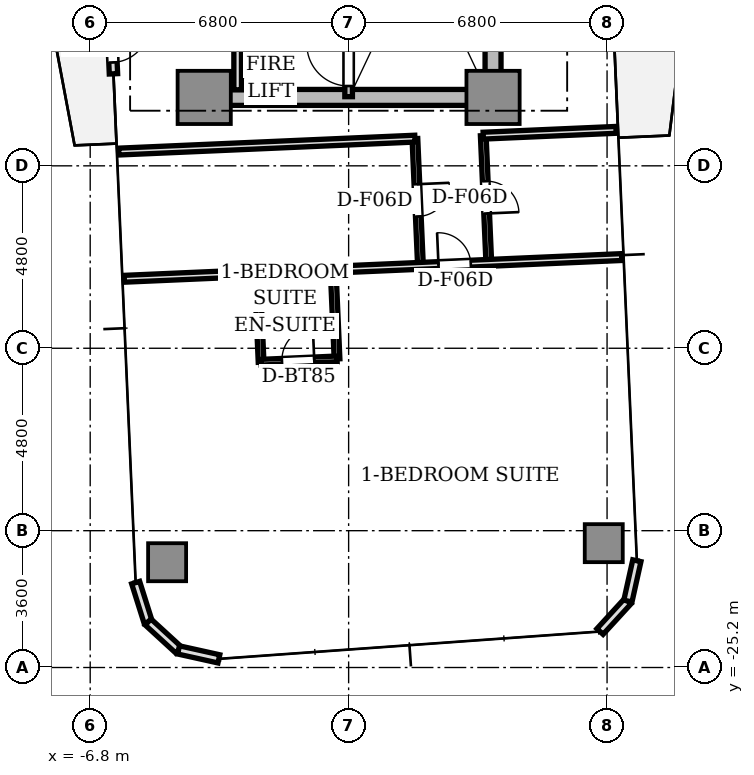
"""IFC4 building model, lengths in metres.
Left out: names, types, materials, properties, quantities, classifications, styles, units other than length and angle.
Written with IfcOpenShell. Run it as: python <this file> out.ifc"""

import sys

from ifc_helpers import new_model, si_unit, direction, frame, frame_2d, origin, origin_2d, place, context, subcontext, project, spatial, rectangle, extrude, source, transform, mapped, element, fill, save


model = new_model("IFC4")
c1 = context("Model", 3, precision=1e-05, world=origin(), true_north=direction((0.0, 1.0)))
c2 = subcontext(c1, "Body", "Model", "MODEL_VIEW")
j1 = project(units=[si_unit("LENGTHUNIT", "METRE"), si_unit("PLANEANGLEUNIT", "RADIAN")], contexts=[c1])
p1 = place(None, origin())
s1 = spatial("IfcSite", under=j1, at=p1, CompositionType="ELEMENT")
p2 = place(p1, origin())
s2 = spatial("IfcBuilding", under=s1, at=p2, CompositionType="ELEMENT")
p3 = place(p2, frame((0.0, 0.0, 100.25)))
s3 = spatial("IfcBuildingStorey", under=s2, at=p3, CompositionType="ELEMENT", Elevation=100.25)
p4 = place(p3, frame((-3.55, -10.2, 0.0), z_axis=(0.0, 0.0, 1.0), x_axis=(1.0, 0.0, 0.0)))
e1 = element("IfcWall", 1, at=p4, inside=s3, PredefinedType="SHEAR", context=c2, shape_type="SweptSolid", body=[
    extrude(rectangle(XDim=7.1, YDim=0.42, at=frame_2d((3.55, 0.0))), origin(), (0.0, 0.0, 1.0), 3.11),
])
p5 = place(p3, frame((3.8, -9.75, 0.0), z_axis=(0.0, 0.0, 1.0), x_axis=(0.0, 1.0, 0.0)))
e2 = element("IfcWall", 2, at=p5, inside=s3, PredefinedType="SHEAR", context=c2, shape_type="SweptSolid", body=[
    extrude(rectangle(XDim=6.9, YDim=0.42, at=frame_2d((3.45, 0.0))), origin(), (0.0, 0.0, 1.0), 3.11),
])
m1 = source(origin(), c2, "Body", "SweptSolid", [
    extrude(rectangle(XDim=1.4, YDim=1.4, at=origin_2d()), origin(), (0.0, 0.0, 1.0), 3.11),
])
for number, where, z_axis, x_axis in (
    (3, (-3.8, -10.2, 0.0), (0.0, 0.0, 1.0), (1.0, 0.0, 0.0)),
    (4, (3.8, -10.2, 0.0), (0.0, 0.0, 1.0), (1.0, 0.0, 0.0)),
):
    element("IfcColumn", number, at=place(p3, frame(where, z_axis=z_axis, x_axis=x_axis)), inside=s3, PredefinedType="COLUMN", context=c2, shape_type="MappedRepresentation", body=[
        mapped(m1, transform((0.0, 0.0, 0.0), scale=1.0)),
    ])
m2 = source(origin(), c2, "Body", "SweptSolid", [
    extrude(rectangle(XDim=1.0, YDim=1.0, at=origin_2d()), origin(), (0.0, 0.0, 1.0), 3.11),
])
for number, where, z_axis, x_axis in (
    (5, (-4.776, -22.43, 0.0), (0.0, 0.0, 1.0), (1.0, 0.0, 0.0)),
    (6, (6.713, -21.928, 0.0), (0.0, 0.0, 1.0), (1.0, 0.0, 0.0)),
):
    element("IfcColumn", number, at=place(p3, frame(where, z_axis=z_axis, x_axis=x_axis)), inside=s3, PredefinedType="COLUMN", context=c2, shape_type="MappedRepresentation", body=[
        mapped(m2, transform((0.0, 0.0, 0.0), scale=1.0)),
    ])
p6 = place(p3, frame((-6.306, -6.882, 0.0), z_axis=(0.0, 0.0, 1.0), x_axis=(0.043672655174, -0.999045894436, 0.0)))
e7 = element("IfcWall", 7, at=p6, inside=s3, PredefinedType="STANDARD", context=c2, shape_type="SweptSolid", body=[
    extrude(rectangle(XDim=2.7, YDim=0.22, at=frame_2d((1.35, 0.0))), origin(), (0.0, 0.0, 1.0), 3.11),
])
p7 = place(p6, frame((1.4, 0.0, 0.0)))
e8 = element("IfcOpeningElement", 8, at=p7, cuts=e7, PredefinedType="OPENING", context=c2, shape_type="SweptSolid", body=[
    extrude(rectangle(XDim=1.0, YDim=2.2, at=frame_2d((0.5, 1.1))), frame((0.0, 0.12, 0.0), z_axis=(0.0, -1.0, 0.0), x_axis=(1.0, 0.0, 0.0)), (0.0, 0.0, 1.0), 0.24),
])
p8 = place(p3, frame((-5.604, -22.966, 0.0), z_axis=(0.0, 0.0, 1.0), x_axis=(0.300755105707, -0.953701403161, 0.0)))
e9 = element("IfcWall", 9, at=p8, inside=s3, PredefinedType="STANDARD", context=c2, shape_type="SweptSolid", body=[
    extrude(rectangle(XDim=1.087, YDim=0.22, at=frame_2d((0.543, 0.0))), origin(), (0.0, 0.0, 1.0), 3.11),
])
p9 = place(p3, frame((-5.277, -24.003, 0.0), z_axis=(0.0, 0.0, 1.0), x_axis=(0.737312600672, -0.675551721847, 0.0)))
e10 = element("IfcWall", 10, at=p9, inside=s3, PredefinedType="STANDARD", context=c2, shape_type="SweptSolid", body=[
    extrude(rectangle(XDim=1.087, YDim=0.22, at=frame_2d((0.543, 0.0))), origin(), (0.0, 0.0, 1.0), 3.11),
])
for number, where, z_axis, x_axis in (
    (11, (-4.475, -24.737, 0.0), (0.0, 0.0, 1.0), (0.976, -0.217, 0.0)),
    (12, (6.614, -24.253, 0.0), (0.0, 0.0, 1.0), (0.676, 0.737, 0.0)),
):
    element("IfcWall", number, at=place(p3, frame(where, z_axis=z_axis, x_axis=x_axis)), inside=s3, PredefinedType="STANDARD", context=c2, shape_type="SweptSolid", body=[
        extrude(rectangle(XDim=1.087, YDim=0.22, at=frame_2d((0.543, 0.0))), origin(), (0.0, 0.0, 1.0), 3.11),
    ])
p10 = place(p3, frame((7.349, -23.452, 0.0), z_axis=(0.0, 0.0, 1.0), x_axis=(0.216454939174, 0.976292609471, 0.0)))
e13 = element("IfcWall", 13, at=p10, inside=s3, PredefinedType="STANDARD", context=c2, shape_type="SweptSolid", body=[
    extrude(rectangle(XDim=1.087, YDim=0.22, at=frame_2d((0.544, 0.0))), origin(), (0.0, 0.0, 1.0), 3.11),
])
p11 = place(p3, frame((0.0, -10.18, 0.0), z_axis=(0.0, 0.0, 1.0), x_axis=(0.0, 1.0, 0.0)))
e14 = element("IfcWall", 14, at=p11, inside=s3, PredefinedType="SOLIDWALL", context=c2, shape_type="SweptSolid", body=[
    extrude(rectangle(XDim=7.68, YDim=0.2, at=frame_2d((3.84, 0.0))), origin(), (0.0, 0.0, 1.0), 3.11),
])
p12 = place(p11, frame((0.28, 0.0, 0.0)))
e15 = element("IfcOpeningElement", 15, at=p12, cuts=e14, PredefinedType="OPENING", context=c2, shape_type="SweptSolid", body=[
    extrude(rectangle(XDim=1.1, YDim=2.15, at=frame_2d((0.55, 1.075))), frame((0.0, 0.11, 0.0), z_axis=(0.0, -1.0, 0.0), x_axis=(1.0, 0.0, 0.0)), (0.0, 0.0, 1.0), 0.22),
])
p13 = place(p3, frame((-2.92, -10.0, 0.0), z_axis=(0.0, 0.0, 1.0), x_axis=(0.0, 1.0, 0.0)))
e16 = element("IfcWall", 16, at=p13, inside=s3, PredefinedType="SOLIDWALL", context=c2, shape_type="SweptSolid", body=[
    extrude(rectangle(XDim=1.44, YDim=0.2, at=frame_2d((0.72, 0.0))), origin(), (0.0, 0.0, 1.0), 2.66),
])
p14 = place(p3, frame((3.542, -11.206, 0.0), z_axis=(0.0, 0.0, 1.0), x_axis=(0.043582710367, -0.99904982226, 0.0)))
e17 = element("IfcWall", 17, at=p14, inside=s3, PredefinedType="PARTITIONING", context=c2, shape_type="SweptSolid", body=[
    extrude(rectangle(XDim=3.35, YDim=0.15, at=frame_2d((1.675, 0.0))), origin(), (0.0, 0.0, 1.0), 2.66),
])
p15 = place(p14, frame((1.2, 0.0, 0.0)))
e18 = element("IfcOpeningElement", 18, at=p15, cuts=e17, PredefinedType="OPENING", context=c2, shape_type="SweptSolid", body=[
    extrude(rectangle(XDim=0.85, YDim=2.1, at=frame_2d((0.425, 1.05))), frame((0.0, 0.085, 0.0), z_axis=(0.0, -1.0, 0.0), x_axis=(1.0, 0.0, 0.0)), (0.0, 0.0, 1.0), 0.17),
])
p16 = place(p3, frame((1.744, -11.285, 0.0), z_axis=(0.0, 0.0, 1.0), x_axis=(0.043579537274, -0.999049960678, 0.0)))
e19 = element("IfcWall", 19, at=p16, inside=s3, PredefinedType="PARTITIONING", context=c2, shape_type="SweptSolid", body=[
    extrude(rectangle(XDim=3.35, YDim=0.15, at=frame_2d((1.675, 0.0))), origin(), (0.0, 0.0, 1.0), 2.66),
])
p17 = place(p16, frame((1.2, 0.0, 0.0)))
e20 = element("IfcOpeningElement", 20, at=p17, cuts=e19, PredefinedType="OPENING", context=c2, shape_type="SweptSolid", body=[
    extrude(rectangle(XDim=0.85, YDim=2.1, at=frame_2d((0.425, 1.05))), frame((0.0, 0.085, 0.0), z_axis=(0.0, -1.0, 0.0), x_axis=(1.0, 0.0, 0.0)), (0.0, 0.0, 1.0), 0.17),
])
p18 = place(p3, frame((3.542, -11.206, 0.0), z_axis=(0.0, 0.0, 1.0), x_axis=(0.999046129111, 0.04366728647, 0.0)))
e21 = element("IfcWall", 21, at=p18, inside=s3, PredefinedType="PARTITIONING", context=c2, shape_type="SweptSolid", body=[
    extrude(rectangle(XDim=3.5, YDim=0.18, at=frame_2d((1.75, 0.0))), origin(), (0.0, 0.0, 1.0), 2.66),
])
p19 = place(p3, frame((-6.049, -11.625, 0.0), z_axis=(0.0, 0.0, 1.0), x_axis=(0.999047634936, 0.043632821702, 0.0)))
e22 = element("IfcWall", 22, at=p19, inside=s3, PredefinedType="PARTITIONING", context=c2, shape_type="SweptSolid", body=[
    extrude(rectangle(XDim=7.8, YDim=0.18, at=frame_2d((3.9, 0.0))), origin(), (0.0, 0.0, 1.0), 2.66),
])
p20 = place(p3, frame((-5.903, -14.972, 0.0), z_axis=(0.0, 0.0, 1.0), x_axis=(0.999048653727, 0.043609488494, 0.0)))
e23 = element("IfcWall", 23, at=p20, inside=s3, PredefinedType="PARTITIONING", context=c2, shape_type="SweptSolid", body=[
    extrude(rectangle(XDim=13.1, YDim=0.18, at=frame_2d((6.55, 0.0))), origin(), (0.0, 0.0, 1.0), 2.66),
])
p21 = place(p20, frame((8.275, 0.0, 0.0)))
e24 = element("IfcOpeningElement", 24, at=p21, cuts=e23, PredefinedType="OPENING", context=c2, shape_type="SweptSolid", body=[
    extrude(rectangle(XDim=0.85, YDim=2.1, at=frame_2d((0.425, 1.05))), frame((0.0, 0.1, 0.0), z_axis=(0.0, -1.0, 0.0), x_axis=(1.0, 0.0, 0.0)), (0.0, 0.0, 1.0), 0.2),
])
p22 = place(p3, frame((-0.408, -14.732, 0.0), z_axis=(0.0, 0.0, 1.0), x_axis=(0.043527387554, -0.999052234136, 0.0)))
e25 = element("IfcWall", 25, at=p22, inside=s3, PredefinedType="PARTITIONING", context=c2, shape_type="SweptSolid", body=[
    extrude(rectangle(XDim=2.35, YDim=0.15, at=frame_2d((1.175, 0.0))), origin(), (0.0, 0.0, 1.0), 2.66),
])
p23 = place(p3, frame((-2.406, -14.819, 0.0), z_axis=(0.0, 0.0, 1.0), x_axis=(0.04363560271, -0.999047513473, 0.0)))
e26 = element("IfcWall", 26, at=p23, inside=s3, PredefinedType="PARTITIONING", context=c2, shape_type="SweptSolid", body=[
    extrude(rectangle(XDim=2.35, YDim=0.15, at=frame_2d((1.175, 0.0))), origin(), (0.0, 0.0, 1.0), 2.66),
])
p24 = place(p3, frame((-2.303, -17.167, 0.0), z_axis=(0.0, 0.0, 1.0), x_axis=(0.999049929275, 0.043580257179, 0.0)))
e27 = element("IfcWall", 27, at=p24, inside=s3, PredefinedType="PARTITIONING", context=c2, shape_type="SweptSolid", body=[
    extrude(rectangle(XDim=2.0, YDim=0.15, at=frame_2d((1.0, 0.0))), origin(), (0.0, 0.0, 1.0), 2.66),
])
p25 = place(p24, frame((0.55, 0.0, 0.0)))
e28 = element("IfcOpeningElement", 28, at=p25, cuts=e27, PredefinedType="OPENING", context=c2, shape_type="SweptSolid", body=[
    extrude(rectangle(XDim=0.85, YDim=2.1, at=frame_2d((0.425, 1.05))), frame((0.0, 0.085, 0.0), z_axis=(0.0, -1.0, 0.0), x_axis=(1.0, 0.0, 0.0)), (0.0, 0.0, 1.0), 0.17),
])
m3 = source(origin(), c2, "Body", "SweptSolid", [
    extrude(rectangle(XDim=1.0, YDim=0.05, at=origin_2d()), origin(), (0.0, 0.0, 1.0), 2.2),
])
p26 = place(p7, frame((0.5, 0.0, 0.0)))
e29 = element("IfcDoor", 29, at=p26, inside=s3, OperationType="SINGLE_SWING_LEFT", PredefinedType="DOOR", context=c2, shape_type="MappedRepresentation", body=[
    mapped(m3, transform((0.0, 0.0, 0.0), scale=1.0)),
])
fill(e8, e29)
m4 = source(origin(), c2, "Body", "SweptSolid", [
    extrude(rectangle(XDim=1.1, YDim=0.05, at=origin_2d()), origin(), (0.0, 0.0, 1.0), 2.15),
])
p27 = place(p12, frame((0.55, 0.0, 0.0)))
e30 = element("IfcDoor", 30, at=p27, inside=s3, OperationType="SINGLE_SWING_RIGHT", PredefinedType="DOOR", context=c2, shape_type="MappedRepresentation", body=[
    mapped(m4, transform((0.0, 0.0, 0.0), scale=1.0)),
])
fill(e15, e30)
m5 = source(origin(), c2, "Body", "SweptSolid", [
    extrude(rectangle(XDim=0.85, YDim=0.05, at=origin_2d()), origin(), (0.0, 0.0, 1.0), 2.1),
])
p28 = place(p15, frame((0.425, 0.0, 0.0)))
e31 = element("IfcDoor", 31, at=p28, inside=s3, OperationType="SINGLE_SWING_RIGHT", PredefinedType="DOOR", context=c2, shape_type="MappedRepresentation", body=[
    mapped(m5, transform((0.0, 0.0, 0.0), scale=1.0)),
])
fill(e18, e31)
p29 = place(p17, frame((0.425, 0.0, 0.0)))
e32 = element("IfcDoor", 32, at=p29, inside=s3, OperationType="SINGLE_SWING_LEFT", PredefinedType="DOOR", context=c2, shape_type="MappedRepresentation", body=[
    mapped(m5, transform((0.0, 0.0, 0.0), scale=1.0)),
])
fill(e20, e32)
p30 = place(p25, frame((0.425, 0.0, 0.0)))
e33 = element("IfcDoor", 33, at=p30, inside=s3, OperationType="SINGLE_SWING_RIGHT", PredefinedType="DOOR", context=c2, shape_type="MappedRepresentation", body=[
    mapped(m5, transform((0.0, 0.0, 0.0), scale=1.0)),
])
fill(e28, e33)
p31 = place(p21, frame((0.425, 0.0, 0.0)))
e34 = element("IfcDoor", 34, at=p31, inside=s3, OperationType="SINGLE_SWING_LEFT", PredefinedType="DOOR", context=c2, shape_type="MappedRepresentation", body=[
    mapped(m5, transform((0.0, 0.0, 0.0), scale=1.0)),
])
fill(e24, e34)
save(model, sys.argv[1])
